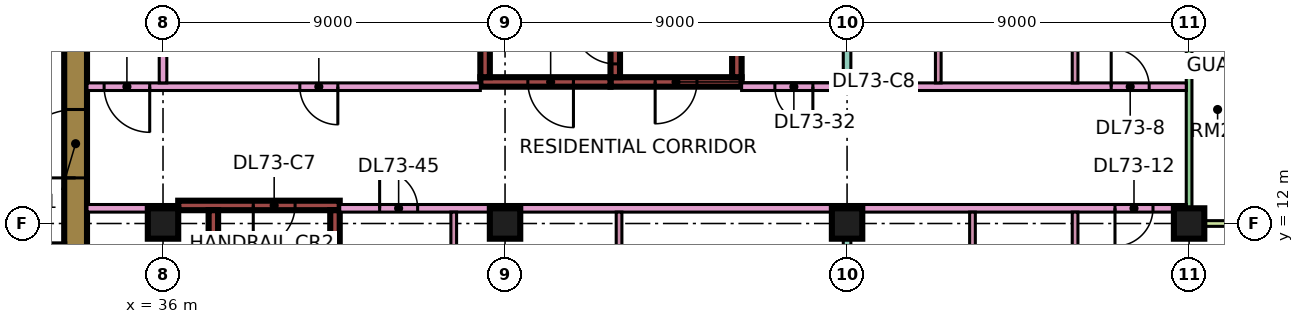
"""IFC4 building model, lengths in metres.
Left out: names, types, materials, properties, quantities, classifications, styles, units other than length and angle.
Written with IfcOpenShell. Run it as: python <this file> out.ifc"""

import sys

from ifc_helpers import new_model, si_unit, direction, frame, frame_2d, origin, origin_2d, place, context, subcontext, project, spatial, rectangle, extrude, element, fill, save


model = new_model("IFC4")
c1 = context("Model", 3, precision=1e-05, world=origin(), true_north=direction((0.0, 1.0)))
c2 = subcontext(c1, "Body", "Model", "MODEL_VIEW")
j1 = project(units=[si_unit("LENGTHUNIT", "METRE"), si_unit("PLANEANGLEUNIT", "RADIAN")], contexts=[c1])
p1 = place(None, origin())
s1 = spatial("IfcSite", under=j1, at=p1, CompositionType="ELEMENT")
p2 = place(p1, origin())
s2 = spatial("IfcBuilding", under=s1, at=p2, CompositionType="ELEMENT")
p3 = place(p2, frame((0.0, 0.0, 310.9)))
s3 = spatial("IfcBuildingStorey", under=s2, at=p3, CompositionType="ELEMENT", Elevation=310.9)
for number, where, z_axis, x_axis in (
    (1, (36.0, 12.0, 0.0), (0.0, 0.0, 1.0), (1.0, 0.0, 0.0)),
    (2, (45.0, 12.0, 0.0), (0.0, 0.0, 1.0), (1.0, 0.0, 0.0)),
    (3, (54.0, 12.0, 0.0), (0.0, 0.0, 1.0), (1.0, 0.0, 0.0)),
    (4, (63.0, 12.0, 0.0), (0.0, 0.0, 1.0), (1.0, 0.0, 0.0)),
):
    element("IfcColumn", number, at=place(p3, frame(where, z_axis=z_axis, x_axis=x_axis)), inside=s3, PredefinedType="COLUMN", context=c2, shape_type="SweptSolid", body=[
        extrude(rectangle(XDim=0.8, YDim=0.8, at=origin_2d()), origin(), (0.0, 0.0, 1.0), 3.75),
    ])
p4 = place(p3, frame((33.7, 7.6, 0.0), z_axis=(0.0, 0.0, 1.0), x_axis=(0.0, 1.0, 0.0)))
e5 = element("IfcWall", 5, at=p4, inside=s3, PredefinedType="SHEAR", context=c2, shape_type="SweptSolid", body=[
    extrude(rectangle(XDim=11.8, YDim=0.6, at=frame_2d((5.9, 0.0))), origin(), (0.0, 0.0, 1.0), 3.75),
])
p5 = place(p4, frame((5.6, 0.0, 0.0)))
e6 = element("IfcOpeningElement", 6, at=p5, cuts=e5, PredefinedType="OPENING", context=c2, shape_type="SweptSolid", body=[
    extrude(rectangle(XDim=1.8, YDim=2.4, at=frame_2d((0.9, 1.2))), frame((0.0, 0.31, 0.0), z_axis=(0.0, -1.0, 0.0), x_axis=(1.0, 0.0, 0.0)), (0.0, 0.0, 1.0), 0.62),
])
p6 = place(p3, frame((36.4, 12.475, 0.0), z_axis=(0.0, 0.0, 1.0), x_axis=(1.0, 0.0, 0.0)))
e7 = element("IfcWall", 7, at=p6, inside=s3, PredefinedType="SHEAR", context=c2, shape_type="SweptSolid", body=[
    extrude(rectangle(XDim=4.25, YDim=0.25, at=frame_2d((2.125, 0.0))), origin(), (0.0, 0.0, 1.0), 3.75),
])
p7 = place(p6, frame((1.975, 0.0, 0.0)))
e8 = element("IfcOpeningElement", 8, at=p7, cuts=e7, PredefinedType="OPENING", context=c2, shape_type="SweptSolid", body=[
    extrude(rectangle(XDim=1.1, YDim=2.2, at=frame_2d((0.55, 1.1))), frame((0.0, 0.135, 0.0), z_axis=(0.0, -1.0, 0.0), x_axis=(1.0, 0.0, 0.0)), (0.0, 0.0, 1.0), 0.27),
])
for number, where, z_axis, x_axis in (
    (9, (37.325, 5.85, 0.0), (0.0, 0.0, 1.0), (0.0, 1.0, 0.0)),
    (10, (40.525, 5.85, 0.0), (0.0, 0.0, 1.0), (0.0, 1.0, 0.0)),
):
    element("IfcWall", number, at=place(p3, frame(where, z_axis=z_axis, x_axis=x_axis)), inside=s3, PredefinedType="SHEAR", context=c2, shape_type="SweptSolid", body=[
        extrude(rectangle(XDim=6.5, YDim=0.25, at=frame_2d((3.25, 0.0))), origin(), (0.0, 0.0, 1.0), 3.75),
    ])
p8 = place(p3, frame((47.775, 15.725, 0.0), z_axis=(0.0, 0.0, 1.0), x_axis=(1.0, 0.0, 0.0)))
e11 = element("IfcWall", 11, at=p8, inside=s3, PredefinedType="SHEAR", context=c2, shape_type="SweptSolid", body=[
    extrude(rectangle(XDim=3.45, YDim=0.25, at=frame_2d((1.725, 0.0))), origin(), (0.0, 0.0, 1.0), 3.75),
])
p9 = place(p8, frame((1.175, 0.0, 0.0)))
e12 = element("IfcOpeningElement", 12, at=p9, cuts=e11, PredefinedType="OPENING", context=c2, shape_type="SweptSolid", body=[
    extrude(rectangle(XDim=1.1, YDim=2.2, at=frame_2d((0.55, 1.1))), frame((0.0, 0.135, 0.0), z_axis=(0.0, -1.0, 0.0), x_axis=(1.0, 0.0, 0.0)), (0.0, 0.0, 1.0), 0.27),
])
p10 = place(p3, frame((47.9, 15.85, 0.0), z_axis=(0.0, 0.0, 1.0), x_axis=(0.0, 1.0, 0.0)))
e13 = element("IfcWall", 13, at=p10, inside=s3, PredefinedType="SHEAR", context=c2, shape_type="SweptSolid", body=[
    extrude(rectangle(XDim=6.5, YDim=0.25, at=frame_2d((3.25, 0.0))), origin(), (0.0, 0.0, 1.0), 3.75),
])
p11 = place(p10, frame((0.35, 0.0, 0.0)))
e14 = element("IfcOpeningElement", 14, at=p11, cuts=e13, PredefinedType="OPENING", context=c2, shape_type="SweptSolid", body=[
    extrude(rectangle(XDim=1.1, YDim=2.2, at=frame_2d((0.55, 1.1))), frame((0.0, 0.135, 0.0), z_axis=(0.0, -1.0, 0.0), x_axis=(1.0, 0.0, 0.0)), (0.0, 0.0, 1.0), 0.27),
])
p12 = place(p3, frame((51.1, 15.85, 0.0), z_axis=(0.0, 0.0, 1.0), x_axis=(0.0, 1.0, 0.0)))
e15 = element("IfcWall", 15, at=p12, inside=s3, PredefinedType="SHEAR", context=c2, shape_type="SweptSolid", body=[
    extrude(rectangle(XDim=6.5, YDim=0.25, at=frame_2d((3.25, 0.0))), origin(), (0.0, 0.0, 1.0), 3.75),
])
p13 = place(p3, frame((44.35, 15.725, 0.0), z_axis=(0.0, 0.0, 1.0), x_axis=(1.0, 0.0, 0.0)))
e16 = element("IfcWall", 16, at=p13, inside=s3, PredefinedType="SHEAR", context=c2, shape_type="SweptSolid", body=[
    extrude(rectangle(XDim=3.425, YDim=0.25, at=frame_2d((1.712, 0.0))), origin(), (0.0, 0.0, 1.0), 3.75),
])
p14 = place(p13, frame((1.25, 0.0, 0.0)))
e17 = element("IfcOpeningElement", 17, at=p14, cuts=e16, PredefinedType="OPENING", context=c2, shape_type="SweptSolid", body=[
    extrude(rectangle(XDim=1.2, YDim=2.2, at=frame_2d((0.6, 1.1))), frame((0.0, 0.135, 0.0), z_axis=(0.0, -1.0, 0.0), x_axis=(1.0, 0.0, 0.0)), (0.0, 0.0, 1.0), 0.27),
])
p15 = place(p3, frame((44.475, 15.85, 0.0), z_axis=(0.0, 0.0, 1.0), x_axis=(0.0, 1.0, 0.0)))
e18 = element("IfcWall", 18, at=p15, inside=s3, PredefinedType="SHEAR", context=c2, shape_type="SweptSolid", body=[
    extrude(rectangle(XDim=6.5, YDim=0.25, at=frame_2d((3.25, 0.0))), origin(), (0.0, 0.0, 1.0), 3.75),
])
p16 = place(p15, frame((1.75, 0.0, 0.0)))
e19 = element("IfcOpeningElement", 19, at=p16, cuts=e18, PredefinedType="OPENING", context=c2, shape_type="SweptSolid", body=[
    extrude(rectangle(XDim=1.1, YDim=2.2, at=frame_2d((0.55, 1.1))), frame((0.0, 0.135, 0.0), z_axis=(0.0, -1.0, 0.0), x_axis=(1.0, 0.0, 0.0)), (0.0, 0.0, 1.0), 0.27),
])
p17 = place(p15, frame((4.3, 0.0, 0.0)))
e20 = element("IfcOpeningElement", 20, at=p17, cuts=e18, PredefinedType="OPENING", context=c2, shape_type="SweptSolid", body=[
    extrude(rectangle(XDim=1.1, YDim=2.2, at=frame_2d((0.55, 1.1))), frame((0.0, 0.135, 0.0), z_axis=(0.0, -1.0, 0.0), x_axis=(1.0, 0.0, 0.0)), (0.0, 0.0, 1.0), 0.27),
])
p18 = place(p3, frame((63.0, 12.075, 0.0), z_axis=(0.0, 0.0, 1.0), x_axis=(0.0, 1.0, 0.0)))
e21 = element("IfcWall", 21, at=p18, inside=s3, PredefinedType="SOLIDWALL", context=c2, shape_type="SweptSolid", body=[
    extrude(rectangle(XDim=10.35, YDim=0.15, at=frame_2d((5.175, 0.0))), origin(), (0.0, 0.0, 1.0), 3.35),
])
p19 = place(p18, frame((6.038, 0.0, 0.0)))
e22 = element("IfcOpeningElement", 22, at=p19, cuts=e21, PredefinedType="OPENING", context=c2, shape_type="SweptSolid", body=[
    extrude(rectangle(XDim=1.8, YDim=2.4, at=frame_2d((0.9, 1.2))), frame((0.0, 0.085, 0.0), z_axis=(0.0, -1.0, 0.0), x_axis=(1.0, 0.0, 0.0)), (0.0, 0.0, 1.0), 0.17),
])
p20 = place(p3, frame((64.5, 12.0, 0.0), z_axis=(0.0, 0.0, 1.0), x_axis=(-1.0, 0.0, 0.0)))
e23 = element("IfcWall", 23, at=p20, inside=s3, PredefinedType="SOLIDWALL", context=c2, shape_type="SweptSolid", body=[
    extrude(rectangle(XDim=1.5, YDim=0.15, at=frame_2d((0.75, 0.0))), origin(), (0.0, 0.0, 1.0), 3.35),
])
p21 = place(p3, frame((34.0, 12.4, 0.0), z_axis=(0.0, 0.0, 1.0), x_axis=(1.0, 0.0, 0.0)))
e24 = element("IfcWall", 24, at=p21, inside=s3, PredefinedType="PARTITIONING", context=c2, shape_type="SweptSolid", body=[
    extrude(rectangle(XDim=2.401, YDim=0.2, at=frame_2d((1.2, 0.0))), origin(), (0.0, 0.0, 1.0), 3.35),
])
p22 = place(p3, frame((34.0, 15.6, 0.0), z_axis=(0.0, 0.0, 1.0), x_axis=(1.0, 0.0, 0.0)))
e25 = element("IfcWall", 25, at=p22, inside=s3, PredefinedType="PARTITIONING", context=c2, shape_type="SweptSolid", body=[
    extrude(rectangle(XDim=10.35, YDim=0.2, at=frame_2d((5.175, 0.0))), origin(), (0.0, 0.0, 1.0), 3.35),
])
p23 = place(p22, frame((5.6, 0.0, 0.0)))
e26 = element("IfcOpeningElement", 26, at=p23, cuts=e25, PredefinedType="OPENING", context=c2, shape_type="SweptSolid", body=[
    extrude(rectangle(XDim=1.0, YDim=2.1, at=frame_2d((0.5, 1.05))), frame((0.0, 0.11, 0.0), z_axis=(0.0, -1.0, 0.0), x_axis=(1.0, 0.0, 0.0)), (0.0, 0.0, 1.0), 0.22),
])
p24 = place(p22, frame((0.45, 0.0, 0.0)))
e27 = element("IfcOpeningElement", 27, at=p24, cuts=e25, PredefinedType="OPENING", context=c2, shape_type="SweptSolid", body=[
    extrude(rectangle(XDim=1.2, YDim=2.1, at=frame_2d((0.6, 1.05))), frame((0.0, 0.11, 0.0), z_axis=(0.0, -1.0, 0.0), x_axis=(1.0, 0.0, 0.0)), (0.0, 0.0, 1.0), 0.22),
])
p25 = place(p3, frame((36.0, 15.7, 0.0), z_axis=(0.0, 0.0, 1.0), x_axis=(0.0, 1.0, 0.0)))
e28 = element("IfcWall", 28, at=p25, inside=s3, PredefinedType="PARTITIONING", context=c2, shape_type="SweptSolid", body=[
    extrude(rectangle(XDim=8.3, YDim=0.2, at=frame_2d((4.15, 0.0))), origin(), (0.0, 0.0, 1.0), 3.35),
])
p26 = place(p3, frame((40.65, 12.4, 0.0), z_axis=(0.0, 0.0, 1.0), x_axis=(1.0, 0.0, 0.0)))
e29 = element("IfcWall", 29, at=p26, inside=s3, PredefinedType="PARTITIONING", context=c2, shape_type="SweptSolid", body=[
    extrude(rectangle(XDim=22.276, YDim=0.2, at=frame_2d((11.138, 0.0))), origin(), (0.0, 0.0, 1.0), 3.35),
])
p27 = place(p26, frame((20.4, 0.0, 0.0)))
e30 = element("IfcOpeningElement", 30, at=p27, cuts=e29, PredefinedType="OPENING", context=c2, shape_type="SweptSolid", body=[
    extrude(rectangle(XDim=1.0, YDim=2.1, at=frame_2d((0.5, 1.05))), frame((0.0, 0.11, 0.0), z_axis=(0.0, -1.0, 0.0), x_axis=(1.0, 0.0, 0.0)), (0.0, 0.0, 1.0), 0.22),
])
p28 = place(p26, frame((1.05, 0.0, 0.0)))
e31 = element("IfcOpeningElement", 31, at=p28, cuts=e29, PredefinedType="OPENING", context=c2, shape_type="SweptSolid", body=[
    extrude(rectangle(XDim=1.0, YDim=2.1, at=frame_2d((0.5, 1.05))), frame((0.0, 0.11, 0.0), z_axis=(0.0, -1.0, 0.0), x_axis=(1.0, 0.0, 0.0)), (0.0, 0.0, 1.0), 0.22),
])
p29 = place(p3, frame((43.65, 5.975, 0.0), z_axis=(0.0, 0.0, 1.0), x_axis=(0.0, 1.0, 0.0)))
e32 = element("IfcWall", 32, at=p29, inside=s3, PredefinedType="PARTITIONING", context=c2, shape_type="SweptSolid", body=[
    extrude(rectangle(XDim=6.325, YDim=0.15, at=frame_2d((3.163, 0.0))), origin(), (0.0, 0.0, 1.0), 3.35),
])
p30 = place(p29, frame((4.275, 0.0, 0.0)))
e33 = element("IfcOpeningElement", 33, at=p30, cuts=e32, PredefinedType="OPENING", context=c2, shape_type="SweptSolid", body=[
    extrude(rectangle(XDim=0.9, YDim=2.1, at=frame_2d((0.45, 1.05))), frame((0.0, 0.085, 0.0), z_axis=(0.0, -1.0, 0.0), x_axis=(1.0, 0.0, 0.0)), (0.0, 0.0, 1.0), 0.17),
])
p31 = place(p3, frame((48.0, 5.975, 0.0), z_axis=(0.0, 0.0, 1.0), x_axis=(0.0, 1.0, 0.0)))
e34 = element("IfcWall", 34, at=p31, inside=s3, PredefinedType="PARTITIONING", context=c2, shape_type="SweptSolid", body=[
    extrude(rectangle(XDim=6.325, YDim=0.15, at=frame_2d((3.163, 0.0))), origin(), (0.0, 0.0, 1.0), 3.35),
])
p32 = place(p3, frame((51.225, 15.6, 0.0), z_axis=(0.0, 0.0, 1.0), x_axis=(1.0, 0.0, 0.0)))
e35 = element("IfcWall", 35, at=p32, inside=s3, PredefinedType="PARTITIONING", context=c2, shape_type="SweptSolid", body=[
    extrude(rectangle(XDim=11.701, YDim=0.2, at=frame_2d((5.851, 0.0))), origin(), (0.0, 0.0, 1.0), 3.35),
])
p33 = place(p32, frame((9.725, 0.0, 0.0)))
e36 = element("IfcOpeningElement", 36, at=p33, cuts=e35, PredefinedType="OPENING", context=c2, shape_type="SweptSolid", body=[
    extrude(rectangle(XDim=1.0, YDim=2.1, at=frame_2d((0.5, 1.05))), frame((0.0, 0.11, 0.0), z_axis=(0.0, -1.0, 0.0), x_axis=(1.0, 0.0, 0.0)), (0.0, 0.0, 1.0), 0.22),
])
p34 = place(p32, frame((0.875, 0.0, 0.0)))
e37 = element("IfcOpeningElement", 37, at=p34, cuts=e35, PredefinedType="OPENING", context=c2, shape_type="SweptSolid", body=[
    extrude(rectangle(XDim=1.0, YDim=2.1, at=frame_2d((0.5, 1.05))), frame((0.0, 0.11, 0.0), z_axis=(0.0, -1.0, 0.0), x_axis=(1.0, 0.0, 0.0)), (0.0, 0.0, 1.0), 0.22),
])
p35 = place(p3, frame((54.0, 0.0, 0.0), z_axis=(0.0, 0.0, 1.0), x_axis=(0.0, 1.0, 0.0)))
e38 = element("IfcWall", 38, at=p35, inside=s3, PredefinedType="PARTITIONING", context=c2, shape_type="SweptSolid", body=[
    extrude(rectangle(XDim=12.3, YDim=0.2, at=frame_2d((6.15, 0.0))), origin(), (0.0, 0.0, 1.0), 3.35),
])
p36 = place(p3, frame((54.0, 15.7, 0.0), z_axis=(0.0, 0.0, 1.0), x_axis=(0.0, 1.0, 0.0)))
e39 = element("IfcWall", 39, at=p36, inside=s3, PredefinedType="PARTITIONING", context=c2, shape_type="SweptSolid", body=[
    extrude(rectangle(XDim=8.3, YDim=0.2, at=frame_2d((4.15, 0.0))), origin(), (0.0, 0.0, 1.0), 3.35),
])
p37 = place(p3, frame((56.4, 15.7, 0.0), z_axis=(0.0, 0.0, 1.0), x_axis=(0.0, 1.0, 0.0)))
e40 = element("IfcWall", 40, at=p37, inside=s3, PredefinedType="PARTITIONING", context=c2, shape_type="SweptSolid", body=[
    extrude(rectangle(XDim=2.525, YDim=0.15, at=frame_2d((1.263, 0.0))), origin(), (0.0, 0.0, 1.0), 3.35),
])
p38 = place(p3, frame((57.3, 7.075, 0.0), z_axis=(0.0, 0.0, 1.0), x_axis=(0.0, 1.0, 0.0)))
e41 = element("IfcWall", 41, at=p38, inside=s3, PredefinedType="PARTITIONING", context=c2, shape_type="SweptSolid", body=[
    extrude(rectangle(XDim=5.225, YDim=0.15, at=frame_2d((2.613, 0.0))), origin(), (0.0, 0.0, 1.0), 3.35),
])
p39 = place(p3, frame((60.0, 7.075, 0.0), z_axis=(0.0, 0.0, 1.0), x_axis=(0.0, 1.0, 0.0)))
e42 = element("IfcWall", 42, at=p39, inside=s3, PredefinedType="PARTITIONING", context=c2, shape_type="SweptSolid", body=[
    extrude(rectangle(XDim=5.225, YDim=0.15, at=frame_2d((2.613, 0.0))), origin(), (0.0, 0.0, 1.0), 3.35),
])
p40 = place(p39, frame((2.275, 0.0, 0.0)))
e43 = element("IfcOpeningElement", 43, at=p40, cuts=e42, PredefinedType="OPENING", context=c2, shape_type="SweptSolid", body=[
    extrude(rectangle(XDim=0.8, YDim=2.1, at=frame_2d((0.4, 1.05))), frame((0.0, 0.085, 0.0), z_axis=(0.0, -1.0, 0.0), x_axis=(1.0, 0.0, 0.0)), (0.0, 0.0, 1.0), 0.17),
])
p41 = place(p3, frame((60.0, 15.7, 0.0), z_axis=(0.0, 0.0, 1.0), x_axis=(0.0, 1.0, 0.0)))
e44 = element("IfcWall", 44, at=p41, inside=s3, PredefinedType="PARTITIONING", context=c2, shape_type="SweptSolid", body=[
    extrude(rectangle(XDim=2.525, YDim=0.15, at=frame_2d((1.263, 0.0))), origin(), (0.0, 0.0, 1.0), 3.35),
])
p42 = place(p41, frame((0.9, 0.0, 0.0)))
e45 = element("IfcOpeningElement", 45, at=p42, cuts=e44, PredefinedType="OPENING", context=c2, shape_type="SweptSolid", body=[
    extrude(rectangle(XDim=0.8, YDim=2.1, at=frame_2d((0.4, 1.05))), frame((0.0, 0.085, 0.0), z_axis=(0.0, -1.0, 0.0), x_axis=(1.0, 0.0, 0.0)), (0.0, 0.0, 1.0), 0.17),
])
p43 = place(p5, origin())
e46 = element("IfcDoor", 46, at=p43, inside=s3, OperationType="DOUBLE_DOOR_SINGLE_SWING", PredefinedType="DOOR", context=c2, shape_type="SweptSolid", body=[
    extrude(rectangle(XDim=1.8, YDim=2.4, at=frame_2d((0.9, 1.2))), frame((0.0, 0.025, 0.0), z_axis=(0.0, -1.0, 0.0), x_axis=(1.0, 0.0, 0.0)), (0.0, 0.0, 1.0), 0.05),
])
fill(e6, e46)
p44 = place(p7, frame((1.1, 0.0, 0.0), z_axis=(0.0, 0.0, 1.0), x_axis=(-1.0, 0.0, 0.0)))
e47 = element("IfcDoor", 47, at=p44, inside=s3, OperationType="SINGLE_SWING_LEFT", PredefinedType="DOOR", context=c2, shape_type="SweptSolid", body=[
    extrude(rectangle(XDim=1.1, YDim=2.2, at=frame_2d((0.55, 1.1))), frame((0.0, 0.025, 0.0), z_axis=(0.0, -1.0, 0.0), x_axis=(1.0, 0.0, 0.0)), (0.0, 0.0, 1.0), 0.05),
])
fill(e8, e47)
p45 = place(p9, frame((1.1, 0.0, 0.0), z_axis=(0.0, 0.0, 1.0), x_axis=(-1.0, 0.0, 0.0)))
e48 = element("IfcDoor", 48, at=p45, inside=s3, OperationType="SINGLE_SWING_LEFT", PredefinedType="DOOR", context=c2, shape_type="SweptSolid", body=[
    extrude(rectangle(XDim=1.1, YDim=2.2, at=frame_2d((0.55, 1.1))), frame((0.0, 0.025, 0.0), z_axis=(0.0, -1.0, 0.0), x_axis=(1.0, 0.0, 0.0)), (0.0, 0.0, 1.0), 0.05),
])
fill(e12, e48)
p46 = place(p14, origin())
e49 = element("IfcDoor", 49, at=p46, inside=s3, OperationType="SINGLE_SWING_RIGHT", PredefinedType="DOOR", context=c2, shape_type="SweptSolid", body=[
    extrude(rectangle(XDim=1.2, YDim=2.2, at=frame_2d((0.6, 1.1))), frame((0.0, 0.025, 0.0), z_axis=(0.0, -1.0, 0.0), x_axis=(1.0, 0.0, 0.0)), (0.0, 0.0, 1.0), 0.05),
])
fill(e17, e49)
p47 = place(p11, frame((1.1, 0.0, 0.0), z_axis=(0.0, 0.0, 1.0), x_axis=(-1.0, 0.0, 0.0)))
e50 = element("IfcDoor", 50, at=p47, inside=s3, OperationType="SINGLE_SWING_RIGHT", PredefinedType="DOOR", context=c2, shape_type="SweptSolid", body=[
    extrude(rectangle(XDim=1.1, YDim=2.2, at=frame_2d((0.55, 1.1))), frame((0.0, 0.025, 0.0), z_axis=(0.0, -1.0, 0.0), x_axis=(1.0, 0.0, 0.0)), (0.0, 0.0, 1.0), 0.05),
])
fill(e14, e50)
p48 = place(p23, origin())
e51 = element("IfcDoor", 51, at=p48, inside=s3, OperationType="SINGLE_SWING_RIGHT", PredefinedType="DOOR", context=c2, shape_type="SweptSolid", body=[
    extrude(rectangle(XDim=1.0, YDim=2.1, at=frame_2d((0.5, 1.05))), frame((0.0, 0.025, 0.0), z_axis=(0.0, -1.0, 0.0), x_axis=(1.0, 0.0, 0.0)), (0.0, 0.0, 1.0), 0.05),
])
fill(e26, e51)
p49 = place(p33, origin())
e52 = element("IfcDoor", 52, at=p49, inside=s3, OperationType="SINGLE_SWING_LEFT", PredefinedType="DOOR", context=c2, shape_type="SweptSolid", body=[
    extrude(rectangle(XDim=1.0, YDim=2.1, at=frame_2d((0.5, 1.05))), frame((0.0, 0.025, 0.0), z_axis=(0.0, -1.0, 0.0), x_axis=(1.0, 0.0, 0.0)), (0.0, 0.0, 1.0), 0.05),
])
fill(e36, e52)
p50 = place(p27, frame((1.0, 0.0, 0.0), z_axis=(0.0, 0.0, 1.0), x_axis=(-1.0, 0.0, 0.0)))
e53 = element("IfcDoor", 53, at=p50, inside=s3, OperationType="SINGLE_SWING_LEFT", PredefinedType="DOOR", context=c2, shape_type="SweptSolid", body=[
    extrude(rectangle(XDim=1.0, YDim=2.1, at=frame_2d((0.5, 1.05))), frame((0.0, 0.025, 0.0), z_axis=(0.0, -1.0, 0.0), x_axis=(1.0, 0.0, 0.0)), (0.0, 0.0, 1.0), 0.05),
])
fill(e30, e53)
p51 = place(p24, origin())
e54 = element("IfcDoor", 54, at=p51, inside=s3, OperationType="SINGLE_SWING_RIGHT", PredefinedType="DOOR", context=c2, shape_type="SweptSolid", body=[
    extrude(rectangle(XDim=1.2, YDim=2.1, at=frame_2d((0.6, 1.05))), frame((0.0, 0.025, 0.0), z_axis=(0.0, -1.0, 0.0), x_axis=(1.0, 0.0, 0.0)), (0.0, 0.0, 1.0), 0.05),
])
fill(e27, e54)
p52 = place(p34, origin())
e55 = element("IfcDoor", 55, at=p52, inside=s3, OperationType="SINGLE_SWING_RIGHT", PredefinedType="DOOR", context=c2, shape_type="SweptSolid", body=[
    extrude(rectangle(XDim=1.0, YDim=2.1, at=frame_2d((0.5, 1.05))), frame((0.0, 0.025, 0.0), z_axis=(0.0, -1.0, 0.0), x_axis=(1.0, 0.0, 0.0)), (0.0, 0.0, 1.0), 0.05),
])
fill(e37, e55)
p53 = place(p28, origin())
e56 = element("IfcDoor", 56, at=p53, inside=s3, OperationType="SINGLE_SWING_LEFT", PredefinedType="DOOR", context=c2, shape_type="SweptSolid", body=[
    extrude(rectangle(XDim=1.0, YDim=2.1, at=frame_2d((0.5, 1.05))), frame((0.0, 0.025, 0.0), z_axis=(0.0, -1.0, 0.0), x_axis=(1.0, 0.0, 0.0)), (0.0, 0.0, 1.0), 0.05),
])
fill(e31, e56)
save(model, sys.argv[1])
